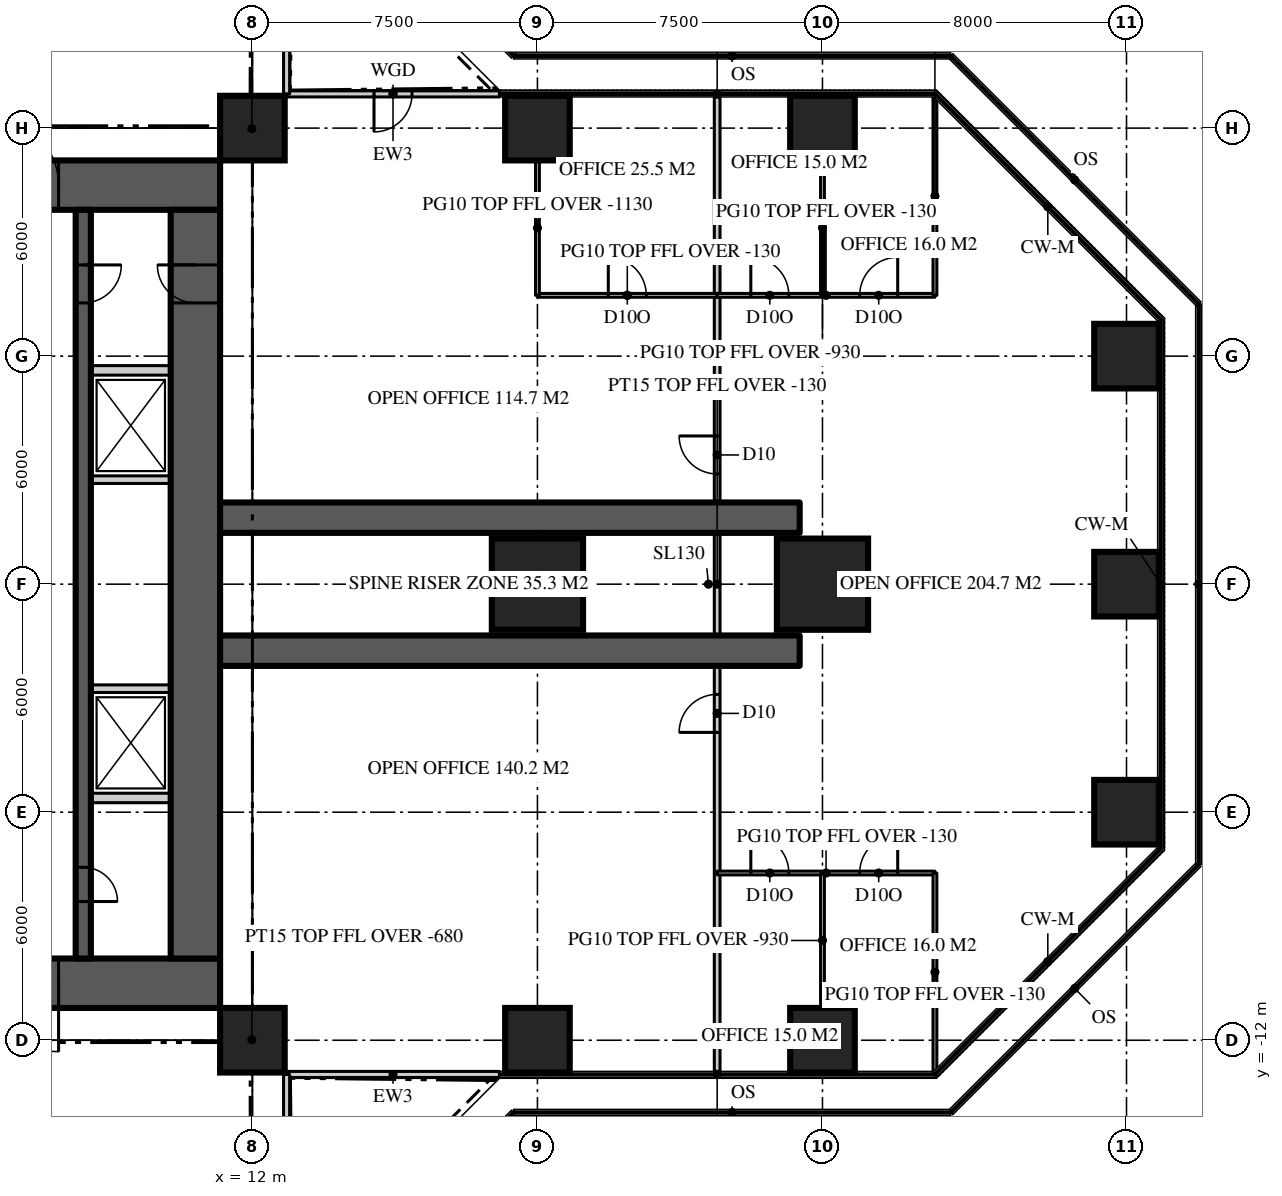
"""IFC4 building model, lengths in metres.
Left out: names, types, materials, properties, quantities, classifications, styles, units other than length and angle.
Written with IfcOpenShell. Run it as: python <this file> out.ifc"""

import sys

from ifc_helpers import new_model, si_unit, direction, frame, frame_2d, origin, origin_2d, place, context, subcontext, project, spatial, rectangle, extrude, element, fill, save


model = new_model("IFC4")
c1 = context("Model", 3, precision=1e-05, world=origin(), true_north=direction((0.0, 1.0)))
c2 = subcontext(c1, "Body", "Model", "MODEL_VIEW")
j1 = project(units=[si_unit("LENGTHUNIT", "METRE"), si_unit("PLANEANGLEUNIT", "RADIAN")], contexts=[c1])
p1 = place(None, origin())
s1 = spatial("IfcSite", under=j1, at=p1, CompositionType="ELEMENT")
p2 = place(p1, origin())
s2 = spatial("IfcBuilding", under=s1, at=p2, CompositionType="ELEMENT")
p3 = place(p2, frame((0.0, 0.0, 132.0)))
s3 = spatial("IfcBuildingStorey", under=s2, at=p3, CompositionType="ELEMENT", Elevation=132.0)
p4 = place(p3, frame((-11.15, 10.5, 0.0), z_axis=(0.0, 0.0, 1.0), x_axis=(1.0, 0.0, 0.0)))
e1 = element("IfcWall", 1, at=p4, inside=s3, PredefinedType="SHEAR", context=c2, shape_type="SweptSolid", body=[
    extrude(rectangle(XDim=22.3, YDim=1.3, at=frame_2d((11.15, 0.0))), origin(), (0.0, 0.0, 1.0), 3.9),
])
p5 = place(p4, frame((4.25, 0.0, 0.0)))
e2 = element("IfcOpeningElement", 2, at=p5, cuts=e1, PredefinedType="OPENING", context=c2, shape_type="SweptSolid", body=[
    extrude(rectangle(XDim=1.8, YDim=2.2, at=frame_2d((0.9, 1.1))), frame((0.0, 0.66, 0.0), z_axis=(0.0, -1.0, 0.0), x_axis=(1.0, 0.0, 0.0)), (0.0, 0.0, 1.0), 1.32),
])
p6 = place(p4, frame((16.25, 0.0, 0.0)))
e3 = element("IfcOpeningElement", 3, at=p6, cuts=e1, PredefinedType="OPENING", context=c2, shape_type="SweptSolid", body=[
    extrude(rectangle(XDim=1.8, YDim=2.2, at=frame_2d((0.9, 1.1))), frame((0.0, 0.66, 0.0), z_axis=(0.0, -1.0, 0.0), x_axis=(1.0, 0.0, 0.0)), (0.0, 0.0, 1.0), 1.32),
])
p7 = place(p3, frame((11.15, -10.5, 0.0), z_axis=(0.0, 0.0, 1.0), x_axis=(-1.0, 0.0, 0.0)))
e4 = element("IfcWall", 4, at=p7, inside=s3, PredefinedType="SHEAR", context=c2, shape_type="SweptSolid", body=[
    extrude(rectangle(XDim=22.3, YDim=1.3, at=frame_2d((11.15, 0.0))), origin(), (0.0, 0.0, 1.0), 3.9),
])
p8 = place(p7, frame((16.25, 0.0, 0.0)))
e5 = element("IfcOpeningElement", 5, at=p8, cuts=e4, PredefinedType="OPENING", context=c2, shape_type="SweptSolid", body=[
    extrude(rectangle(XDim=1.8, YDim=2.2, at=frame_2d((0.9, 1.1))), frame((0.0, 0.66, 0.0), z_axis=(0.0, -1.0, 0.0), x_axis=(1.0, 0.0, 0.0)), (0.0, 0.0, 1.0), 1.32),
])
p9 = place(p7, frame((4.25, 0.0, 0.0)))
e6 = element("IfcOpeningElement", 6, at=p9, cuts=e4, PredefinedType="OPENING", context=c2, shape_type="SweptSolid", body=[
    extrude(rectangle(XDim=1.8, YDim=2.2, at=frame_2d((0.9, 1.1))), frame((0.0, 0.66, 0.0), z_axis=(0.0, -1.0, 0.0), x_axis=(1.0, 0.0, 0.0)), (0.0, 0.0, 1.0), 1.32),
])
p10 = place(p3, frame((10.5, -9.85, 0.0), z_axis=(0.0, 0.0, 1.0), x_axis=(0.0, 1.0, 0.0)))
e7 = element("IfcWall", 7, at=p10, inside=s3, PredefinedType="SHEAR", context=c2, shape_type="SweptSolid", body=[
    extrude(rectangle(XDim=19.7, YDim=1.3, at=frame_2d((9.85, 0.0))), origin(), (0.0, 0.0, 1.0), 3.9),
])
p11 = place(p10, frame((17.25, 0.0, 0.0)))
e8 = element("IfcOpeningElement", 8, at=p11, cuts=e7, PredefinedType="OPENING", context=c2, shape_type="SweptSolid", body=[
    extrude(rectangle(XDim=1.0, YDim=2.2, at=frame_2d((0.5, 1.1))), frame((0.0, 0.66, 0.0), z_axis=(0.0, -1.0, 0.0), x_axis=(1.0, 0.0, 0.0)), (0.0, 0.0, 1.0), 1.32),
])
for number, where, z_axis, x_axis in (
    (9, (11.15, -1.75, 0.0), (0.0, 0.0, 1.0), (1.0, 0.0, 0.0)),
    (10, (11.15, 1.75, 0.0), (0.0, 0.0, 1.0), (1.0, 0.0, 0.0)),
):
    element("IfcWall", number, at=place(p3, frame(where, z_axis=z_axis, x_axis=x_axis)), inside=s3, PredefinedType="SHEAR", context=c2, shape_type="SweptSolid", body=[
        extrude(rectangle(XDim=15.25, YDim=0.8, at=frame_2d((7.625, 0.0))), origin(), (0.0, 0.0, 1.0), 3.9),
    ])
for number, where, z_axis, x_axis in (
    (11, (12.0, -12.0, 0.0), (0.0, 0.0, 1.0), (1.0, 0.0, 0.0)),
    (12, (19.5, -12.0, 0.0), (0.0, 0.0, 1.0), (1.0, 0.0, 0.0)),
    (13, (27.0, -12.0, 0.0), (0.0, 0.0, 1.0), (1.0, 0.0, 0.0)),
    (14, (35.0, -6.0, 0.0), (0.0, 0.0, 1.0), (1.0, 0.0, 0.0)),
):
    element("IfcColumn", number, at=place(p3, frame(where, z_axis=z_axis, x_axis=x_axis)), inside=s3, PredefinedType="COLUMN", context=c2, shape_type="SweptSolid", body=[
        extrude(rectangle(XDim=1.7, YDim=1.7, at=origin_2d()), origin(), (0.0, 0.0, 1.0), 3.9),
    ])
for number, where, z_axis, x_axis in (
    (15, (19.5, 0.0, 0.0), (0.0, 0.0, 1.0), (1.0, 0.0, 0.0)),
    (16, (27.0, 0.0, 0.0), (0.0, 0.0, 1.0), (1.0, 0.0, 0.0)),
):
    element("IfcColumn", number, at=place(p3, frame(where, z_axis=z_axis, x_axis=x_axis)), inside=s3, PredefinedType="COLUMN", context=c2, shape_type="SweptSolid", body=[
        extrude(rectangle(XDim=2.4, YDim=2.4, at=origin_2d()), origin(), (0.0, 0.0, 1.0), 3.9),
    ])
for number, where, z_axis, x_axis in (
    (17, (35.0, 0.0, 0.0), (0.0, 0.0, 1.0), (1.0, 0.0, 0.0)),
    (18, (35.0, 6.0, 0.0), (0.0, 0.0, 1.0), (1.0, 0.0, 0.0)),
    (19, (12.0, 12.0, 0.0), (0.0, 0.0, 1.0), (1.0, 0.0, 0.0)),
    (20, (19.5, 12.0, 0.0), (0.0, 0.0, 1.0), (1.0, 0.0, 0.0)),
    (21, (27.0, 12.0, 0.0), (0.0, 0.0, 1.0), (1.0, 0.0, 0.0)),
):
    element("IfcColumn", number, at=place(p3, frame(where, z_axis=z_axis, x_axis=x_axis)), inside=s3, PredefinedType="COLUMN", context=c2, shape_type="SweptSolid", body=[
        extrude(rectangle(XDim=1.7, YDim=1.7, at=origin_2d()), origin(), (0.0, 0.0, 1.0), 3.9),
    ])
p12 = place(p3, frame((12.9, -12.9, 0.0), z_axis=(0.0, 0.0, 1.0), x_axis=(1.0, 0.0, 0.0)))
e22 = element("IfcWall", 22, at=p12, inside=s3, PredefinedType="SOLIDWALL", context=c2, shape_type="SweptSolid", body=[
    extrude(rectangle(XDim=5.6, YDim=0.16, at=frame_2d((2.8, 0.0))), origin(), (0.0, 0.0, 1.0), 3.77),
])
p13 = place(p3, frame((18.5, 12.9, 0.0), z_axis=(0.0, 0.0, 1.0), x_axis=(-1.0, 0.0, 0.0)))
e23 = element("IfcWall", 23, at=p13, inside=s3, PredefinedType="SOLIDWALL", context=c2, shape_type="SweptSolid", body=[
    extrude(rectangle(XDim=5.6, YDim=0.16, at=frame_2d((2.8, 0.0))), origin(), (0.0, 0.0, 1.0), 3.77),
])
p14 = place(p13, frame((2.3, 0.0, 0.0)))
e24 = element("IfcOpeningElement", 24, at=p14, cuts=e23, PredefinedType="OPENING", context=c2, shape_type="SweptSolid", body=[
    extrude(rectangle(XDim=1.0, YDim=2.2, at=frame_2d((0.5, 1.1))), frame((0.0, 0.09, 0.0), z_axis=(0.0, -1.0, 0.0), x_axis=(1.0, 0.0, 0.0)), (0.0, 0.0, 1.0), 0.18),
])
p15 = place(p3, frame((12.9, 12.9, 0.0), z_axis=(0.0, 0.0, 1.0), x_axis=(0.0, 1.0, 0.0)))
e25 = element("IfcWall", 25, at=p15, inside=s3, PredefinedType="SOLIDWALL", context=c2, shape_type="SweptSolid", body=[
    extrude(rectangle(XDim=5.6, YDim=0.16, at=frame_2d((2.8, 0.0))), origin(), (0.0, 0.0, 1.0), 3.77),
])
p16 = place(p3, frame((12.9, -18.5, 0.0), z_axis=(0.0, 0.0, 1.0), x_axis=(0.0, 1.0, 0.0)))
e26 = element("IfcWall", 26, at=p16, inside=s3, PredefinedType="SOLIDWALL", context=c2, shape_type="SweptSolid", body=[
    extrude(rectangle(XDim=5.6, YDim=0.16, at=frame_2d((2.8, 0.0))), origin(), (0.0, 0.0, 1.0), 3.77),
])
p17 = place(p16, frame((2.3, 0.0, 0.0)))
e27 = element("IfcOpeningElement", 27, at=p17, cuts=e26, PredefinedType="OPENING", context=c2, shape_type="SweptSolid", body=[
    extrude(rectangle(XDim=1.0, YDim=2.2, at=frame_2d((0.5, 1.1))), frame((0.0, 0.09, 0.0), z_axis=(0.0, -1.0, 0.0), x_axis=(1.0, 0.0, 0.0)), (0.0, 0.0, 1.0), 0.18),
])
p18 = place(p3, frame((7.55, 9.85, 0.0), z_axis=(0.0, 0.0, 1.0), x_axis=(0.0, -1.0, 0.0)))
e28 = element("IfcWall", 28, at=p18, inside=s3, PredefinedType="SHEAR", context=c2, shape_type="SweptSolid", body=[
    extrude(rectangle(XDim=19.7, YDim=0.4, at=frame_2d((9.85, 0.0))), origin(), (0.0, 0.0, 1.0), 3.9),
])
p19 = place(p18, frame((1.45, 0.0, 0.0)))
e29 = element("IfcOpeningElement", 29, at=p19, cuts=e28, PredefinedType="OPENING", context=c2, shape_type="SweptSolid", body=[
    extrude(rectangle(XDim=1.0, YDim=2.2, at=frame_2d((0.5, 1.1))), frame((0.0, 0.21, 0.0), z_axis=(0.0, -1.0, 0.0), x_axis=(1.0, 0.0, 0.0)), (0.0, 0.0, 1.0), 0.42),
])
p20 = place(p18, frame((17.3, 0.0, 0.0)))
e30 = element("IfcOpeningElement", 30, at=p20, cuts=e28, PredefinedType="OPENING", context=c2, shape_type="SweptSolid", body=[
    extrude(rectangle(XDim=0.9, YDim=2.1, at=frame_2d((0.45, 1.05))), frame((0.0, 0.21, 0.0), z_axis=(0.0, -1.0, 0.0), x_axis=(1.0, 0.0, 0.0)), (0.0, 0.0, 1.0), 0.42),
])
for number, where, z_axis, x_axis in (
    (31, (7.75, 5.625, 0.0), (0.0, 0.0, 1.0), (1.0, 0.0, 0.0)),
    (32, (7.75, -5.625, 0.0), (0.0, 0.0, 1.0), (1.0, 0.0, 0.0)),
):
    element("IfcWall", number, at=place(p3, frame(where, z_axis=z_axis, x_axis=x_axis)), inside=s3, PredefinedType="SOLIDWALL", context=c2, shape_type="SweptSolid", body=[
        extrude(rectangle(XDim=2.1, YDim=0.25, at=frame_2d((1.05, 0.0))), origin(), (0.0, 0.0, 1.0), 3.7),
    ])
for number, where, z_axis, x_axis in (
    (33, (7.75, -2.75, 0.0), (0.0, 0.0, 1.0), (1.0, 0.0, 0.0)),
    (34, (7.75, 2.75, 0.0), (0.0, 0.0, 1.0), (1.0, 0.0, 0.0)),
):
    element("IfcWall", number, at=place(p3, frame(where, z_axis=z_axis, x_axis=x_axis)), inside=s3, PredefinedType="SOLIDWALL", context=c2, shape_type="SweptSolid", body=[
        extrude(rectangle(XDim=2.1, YDim=0.2, at=frame_2d((1.05, 0.0))), origin(), (0.0, 0.0, 1.0), 3.7),
    ])
p21 = place(p3, frame((24.229, -12.82, 0.0), z_axis=(0.0, 0.0, 1.0), x_axis=(0.0, 1.0, 0.0)))
e35 = element("IfcWall", 35, at=p21, inside=s3, PredefinedType="PARTITIONING", context=c2, shape_type="SweptSolid", body=[
    extrude(rectangle(XDim=25.64, YDim=0.15, at=frame_2d((12.82, 0.0))), origin(), (0.0, 0.0, 1.0), 3.77),
])
p22 = place(p21, frame((15.72, 0.0, 0.0)))
e36 = element("IfcOpeningElement", 36, at=p22, cuts=e35, PredefinedType="OPENING", context=c2, shape_type="SweptSolid", body=[
    extrude(rectangle(XDim=1.0, YDim=2.2, at=frame_2d((0.5, 1.1))), frame((0.0, 0.085, 0.0), z_axis=(0.0, -1.0, 0.0), x_axis=(1.0, 0.0, 0.0)), (0.0, 0.0, 1.0), 0.17),
])
p23 = place(p21, frame((8.92, 0.0, 0.0)))
e37 = element("IfcOpeningElement", 37, at=p23, cuts=e35, PredefinedType="OPENING", context=c2, shape_type="SweptSolid", body=[
    extrude(rectangle(XDim=1.0, YDim=2.2, at=frame_2d((0.5, 1.1))), frame((0.0, 0.085, 0.0), z_axis=(0.0, -1.0, 0.0), x_axis=(1.0, 0.0, 0.0)), (0.0, 0.0, 1.0), 0.17),
])
p24 = place(p3, frame((19.5, 7.6, 0.0), z_axis=(0.0, 0.0, 1.0), x_axis=(1.0, 0.0, 0.0)))
e38 = element("IfcWall", 38, at=p24, inside=s3, PredefinedType="PARTITIONING", context=c2, shape_type="SweptSolid", body=[
    extrude(rectangle(XDim=4.729, YDim=0.1, at=frame_2d((2.365, 0.0))), origin(), (0.0, 0.0, 1.0), 3.77),
])
p25 = place(p24, frame((1.865, 0.0, 0.0)))
e39 = element("IfcOpeningElement", 39, at=p25, cuts=e38, PredefinedType="OPENING", context=c2, shape_type="SweptSolid", body=[
    extrude(rectangle(XDim=1.0, YDim=2.2, at=frame_2d((0.5, 1.1))), frame((0.0, 0.06, 0.0), z_axis=(0.0, -1.0, 0.0), x_axis=(1.0, 0.0, 0.0)), (0.0, 0.0, 1.0), 0.12),
])
p26 = place(p3, frame((24.229, 7.6, 0.0), z_axis=(0.0, 0.0, 1.0), x_axis=(1.0, 0.0, 0.0)))
e40 = element("IfcWall", 40, at=p26, inside=s3, PredefinedType="PARTITIONING", context=c2, shape_type="SweptSolid", body=[
    extrude(rectangle(XDim=5.73, YDim=0.1, at=frame_2d((2.865, 0.0))), origin(), (0.0, 0.0, 1.0), 3.77),
])
p27 = place(p26, frame((0.885, 0.0, 0.0)))
e41 = element("IfcOpeningElement", 41, at=p27, cuts=e40, PredefinedType="OPENING", context=c2, shape_type="SweptSolid", body=[
    extrude(rectangle(XDim=1.0, YDim=2.2, at=frame_2d((0.5, 1.1))), frame((0.0, 0.06, 0.0), z_axis=(0.0, -1.0, 0.0), x_axis=(1.0, 0.0, 0.0)), (0.0, 0.0, 1.0), 0.12),
])
p28 = place(p26, frame((3.75, 0.0, 0.0)))
e42 = element("IfcOpeningElement", 42, at=p28, cuts=e40, PredefinedType="OPENING", context=c2, shape_type="SweptSolid", body=[
    extrude(rectangle(XDim=1.0, YDim=2.2, at=frame_2d((0.5, 1.1))), frame((0.0, 0.06, 0.0), z_axis=(0.0, -1.0, 0.0), x_axis=(1.0, 0.0, 0.0)), (0.0, 0.0, 1.0), 0.12),
])
p29 = place(p3, frame((19.5, 7.6, 0.0), z_axis=(0.0, 0.0, 1.0), x_axis=(0.0, 1.0, 0.0)))
e43 = element("IfcWall", 43, at=p29, inside=s3, PredefinedType="PARTITIONING", context=c2, shape_type="SweptSolid", body=[
    extrude(rectangle(XDim=3.55, YDim=0.1, at=frame_2d((1.775, 0.0))), origin(), (0.0, 0.0, 1.0), 2.77),
])
p30 = place(p3, frame((27.0, 7.6, 0.0), z_axis=(0.0, 0.0, 1.0), x_axis=(0.0, 1.0, 0.0)))
e44 = element("IfcWall", 44, at=p30, inside=s3, PredefinedType="PARTITIONING", context=c2, shape_type="SweptSolid", body=[
    extrude(rectangle(XDim=3.55, YDim=0.1, at=frame_2d((1.775, 0.0))), origin(), (0.0, 0.0, 1.0), 2.97),
])
p31 = place(p3, frame((29.959, 7.6, 0.0), z_axis=(0.0, 0.0, 1.0), x_axis=(0.0, 1.0, 0.0)))
e45 = element("IfcWall", 45, at=p31, inside=s3, PredefinedType="PARTITIONING", context=c2, shape_type="SweptSolid", body=[
    extrude(rectangle(XDim=5.22, YDim=0.1, at=frame_2d((2.61, 0.0))), origin(), (0.0, 0.0, 1.0), 3.77),
])
p32 = place(p3, frame((24.229, -7.6, 0.0), z_axis=(0.0, 0.0, 1.0), x_axis=(1.0, 0.0, 0.0)))
e46 = element("IfcWall", 46, at=p32, inside=s3, PredefinedType="PARTITIONING", context=c2, shape_type="SweptSolid", body=[
    extrude(rectangle(XDim=5.73, YDim=0.1, at=frame_2d((2.865, 0.0))), origin(), (0.0, 0.0, 1.0), 3.77),
])
p33 = place(p32, frame((0.885, 0.0, 0.0)))
e47 = element("IfcOpeningElement", 47, at=p33, cuts=e46, PredefinedType="OPENING", context=c2, shape_type="SweptSolid", body=[
    extrude(rectangle(XDim=1.0, YDim=2.2, at=frame_2d((0.5, 1.1))), frame((0.0, 0.06, 0.0), z_axis=(0.0, -1.0, 0.0), x_axis=(1.0, 0.0, 0.0)), (0.0, 0.0, 1.0), 0.12),
])
p34 = place(p32, frame((3.75, 0.0, 0.0)))
e48 = element("IfcOpeningElement", 48, at=p34, cuts=e46, PredefinedType="OPENING", context=c2, shape_type="SweptSolid", body=[
    extrude(rectangle(XDim=1.0, YDim=2.2, at=frame_2d((0.5, 1.1))), frame((0.0, 0.06, 0.0), z_axis=(0.0, -1.0, 0.0), x_axis=(1.0, 0.0, 0.0)), (0.0, 0.0, 1.0), 0.12),
])
p35 = place(p3, frame((27.0, -7.6, 0.0), z_axis=(0.0, 0.0, 1.0), x_axis=(0.0, -1.0, 0.0)))
e49 = element("IfcWall", 49, at=p35, inside=s3, PredefinedType="PARTITIONING", context=c2, shape_type="SweptSolid", body=[
    extrude(rectangle(XDim=3.55, YDim=0.1, at=frame_2d((1.775, 0.0))), origin(), (0.0, 0.0, 1.0), 2.97),
])
p36 = place(p3, frame((29.959, -7.6, 0.0), z_axis=(0.0, 0.0, 1.0), x_axis=(0.0, -1.0, 0.0)))
e50 = element("IfcWall", 50, at=p36, inside=s3, PredefinedType="PARTITIONING", context=c2, shape_type="SweptSolid", body=[
    extrude(rectangle(XDim=5.22, YDim=0.1, at=frame_2d((2.61, 0.0))), origin(), (0.0, 0.0, 1.0), 3.77),
])
for number, where, z_axis, x_axis in (
    (51, (11.15, 11.15, 0.0), (0.0, 0.0, 1.0), (0.707, 0.707, 0.0)),
    (52, (11.15, -11.15, 0.0), (0.0, 0.0, 1.0), (0.707, -0.707, 0.0)),
):
    element("IfcWall", number, at=place(p3, frame(where, z_axis=z_axis, x_axis=x_axis)), inside=s3, PredefinedType="PARTITIONING", context=c2, shape_type="SweptSolid", body=[
        extrude(rectangle(XDim=2.362, YDim=0.15, at=frame_2d((1.181, 0.0))), origin(), (0.0, 0.0, 1.0), 3.22),
    ])
p37 = place(p14, origin())
e53 = element("IfcDoor", 53, at=p37, inside=s3, OperationType="SINGLE_SWING_RIGHT", PredefinedType="DOOR", context=c2, shape_type="SweptSolid", body=[
    extrude(rectangle(XDim=1.0, YDim=2.2, at=frame_2d((0.5, 1.1))), frame((0.0, 0.025, 0.0), z_axis=(0.0, -1.0, 0.0), x_axis=(1.0, 0.0, 0.0)), (0.0, 0.0, 1.0), 0.05),
])
fill(e24, e53)
p38 = place(p6, origin())
e54 = element("IfcDoor", 54, at=p38, inside=s3, OperationType="DOUBLE_DOOR_DOUBLE_SWING", PredefinedType="DOOR", context=c2, shape_type="SweptSolid", body=[
    extrude(rectangle(XDim=1.8, YDim=2.2, at=frame_2d((0.9, 1.1))), frame((0.0, 0.025, 0.0), z_axis=(0.0, -1.0, 0.0), x_axis=(1.0, 0.0, 0.0)), (0.0, 0.0, 1.0), 0.05),
])
fill(e3, e54)
p39 = place(p9, origin())
e55 = element("IfcDoor", 55, at=p39, inside=s3, OperationType="DOUBLE_DOOR_DOUBLE_SWING", PredefinedType="DOOR", context=c2, shape_type="SweptSolid", body=[
    extrude(rectangle(XDim=1.8, YDim=2.2, at=frame_2d((0.9, 1.1))), frame((0.0, 0.025, 0.0), z_axis=(0.0, -1.0, 0.0), x_axis=(1.0, 0.0, 0.0)), (0.0, 0.0, 1.0), 0.05),
])
fill(e6, e55)
p40 = place(p19, origin())
e56 = element("IfcDoor", 56, at=p40, inside=s3, OperationType="SINGLE_SWING_LEFT", PredefinedType="DOOR", context=c2, shape_type="SweptSolid", body=[
    extrude(rectangle(XDim=1.0, YDim=2.2, at=frame_2d((0.5, 1.1))), frame((0.0, 0.025, 0.0), z_axis=(0.0, -1.0, 0.0), x_axis=(1.0, 0.0, 0.0)), (0.0, 0.0, 1.0), 0.05),
])
fill(e29, e56)
p41 = place(p11, origin())
e57 = element("IfcDoor", 57, at=p41, inside=s3, OperationType="SINGLE_SWING_RIGHT", PredefinedType="DOOR", context=c2, shape_type="SweptSolid", body=[
    extrude(rectangle(XDim=1.0, YDim=2.2, at=frame_2d((0.5, 1.1))), frame((0.0, 0.025, 0.0), z_axis=(0.0, -1.0, 0.0), x_axis=(1.0, 0.0, 0.0)), (0.0, 0.0, 1.0), 0.05),
])
fill(e8, e57)
p42 = place(p20, origin())
e58 = element("IfcDoor", 58, at=p42, inside=s3, OperationType="SINGLE_SWING_RIGHT", PredefinedType="DOOR", context=c2, shape_type="SweptSolid", body=[
    extrude(rectangle(XDim=0.9, YDim=2.1, at=frame_2d((0.45, 1.05))), frame((0.0, 0.025, 0.0), z_axis=(0.0, -1.0, 0.0), x_axis=(1.0, 0.0, 0.0)), (0.0, 0.0, 1.0), 0.05),
])
fill(e30, e58)
p43 = place(p22, origin())
e59 = element("IfcDoor", 59, at=p43, inside=s3, OperationType="SINGLE_SWING_RIGHT", PredefinedType="DOOR", context=c2, shape_type="SweptSolid", body=[
    extrude(rectangle(XDim=1.0, YDim=2.2, at=frame_2d((0.5, 1.1))), frame((0.0, 0.025, 0.0), z_axis=(0.0, -1.0, 0.0), x_axis=(1.0, 0.0, 0.0)), (0.0, 0.0, 1.0), 0.05),
])
fill(e36, e59)
p44 = place(p23, origin())
e60 = element("IfcDoor", 60, at=p44, inside=s3, OperationType="SINGLE_SWING_LEFT", PredefinedType="DOOR", context=c2, shape_type="SweptSolid", body=[
    extrude(rectangle(XDim=1.0, YDim=2.2, at=frame_2d((0.5, 1.1))), frame((0.0, 0.025, 0.0), z_axis=(0.0, -1.0, 0.0), x_axis=(1.0, 0.0, 0.0)), (0.0, 0.0, 1.0), 0.05),
])
fill(e37, e60)
p45 = place(p25, origin())
e61 = element("IfcDoor", 61, at=p45, inside=s3, OperationType="SINGLE_SWING_LEFT", PredefinedType="DOOR", context=c2, shape_type="SweptSolid", body=[
    extrude(rectangle(XDim=1.0, YDim=2.2, at=frame_2d((0.5, 1.1))), frame((0.0, 0.025, 0.0), z_axis=(0.0, -1.0, 0.0), x_axis=(1.0, 0.0, 0.0)), (0.0, 0.0, 1.0), 0.05),
])
fill(e39, e61)
p46 = place(p27, origin())
e62 = element("IfcDoor", 62, at=p46, inside=s3, OperationType="SINGLE_SWING_LEFT", PredefinedType="DOOR", context=c2, shape_type="SweptSolid", body=[
    extrude(rectangle(XDim=1.0, YDim=2.2, at=frame_2d((0.5, 1.1))), frame((0.0, 0.025, 0.0), z_axis=(0.0, -1.0, 0.0), x_axis=(1.0, 0.0, 0.0)), (0.0, 0.0, 1.0), 0.05),
])
fill(e41, e62)
p47 = place(p28, origin())
e63 = element("IfcDoor", 63, at=p47, inside=s3, OperationType="SINGLE_SWING_RIGHT", PredefinedType="DOOR", context=c2, shape_type="SweptSolid", body=[
    extrude(rectangle(XDim=1.0, YDim=2.2, at=frame_2d((0.5, 1.1))), frame((0.0, 0.025, 0.0), z_axis=(0.0, -1.0, 0.0), x_axis=(1.0, 0.0, 0.0)), (0.0, 0.0, 1.0), 0.05),
])
fill(e42, e63)
p48 = place(p33, origin())
e64 = element("IfcDoor", 64, at=p48, inside=s3, OperationType="SINGLE_SWING_LEFT", PredefinedType="DOOR", context=c2, shape_type="SweptSolid", body=[
    extrude(rectangle(XDim=1.0, YDim=2.2, at=frame_2d((0.5, 1.1))), frame((0.0, 0.025, 0.0), z_axis=(0.0, -1.0, 0.0), x_axis=(1.0, 0.0, 0.0)), (0.0, 0.0, 1.0), 0.05),
])
fill(e47, e64)
p49 = place(p34, origin())
e65 = element("IfcDoor", 65, at=p49, inside=s3, OperationType="SINGLE_SWING_RIGHT", PredefinedType="DOOR", context=c2, shape_type="SweptSolid", body=[
    extrude(rectangle(XDim=1.0, YDim=2.2, at=frame_2d((0.5, 1.1))), frame((0.0, 0.025, 0.0), z_axis=(0.0, -1.0, 0.0), x_axis=(1.0, 0.0, 0.0)), (0.0, 0.0, 1.0), 0.05),
])
fill(e48, e65)
save(model, sys.argv[1])
